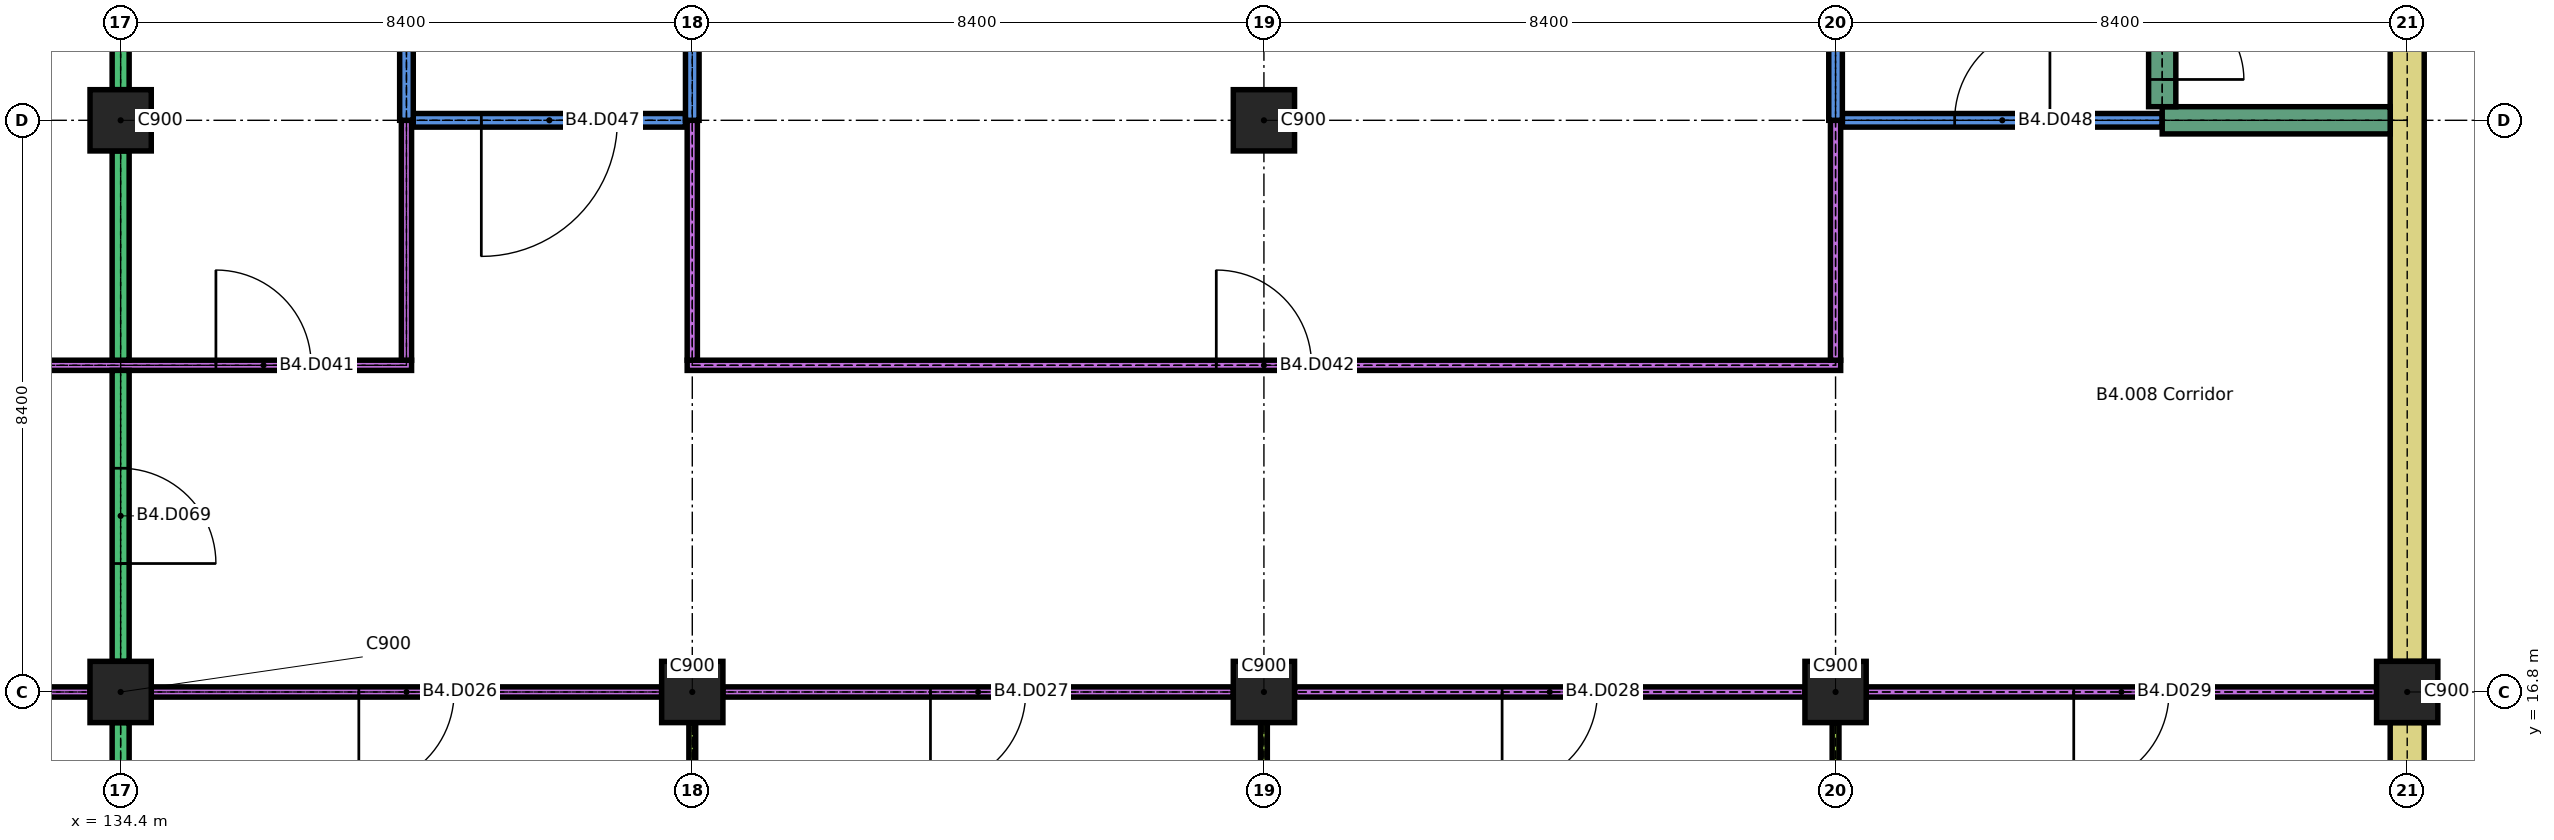
"""IFC4 building model, lengths in metres.
Left out: names, types, materials, properties, quantities, classifications, styles, units other than length and angle.
Written with IfcOpenShell. Run it as: python <this file> out.ifc"""

import sys

from ifc_helpers import new_model, si_unit, direction, frame, frame_2d, origin, origin_2d, place, context, subcontext, project, spatial, rectangle, extrude, element, fill, save


model = new_model("IFC4")
c1 = context("Model", 3, precision=1e-05, world=origin(), true_north=direction((0.0, 1.0)))
c2 = subcontext(c1, "Body", "Model", "MODEL_VIEW")
j1 = project(units=[si_unit("LENGTHUNIT", "METRE"), si_unit("PLANEANGLEUNIT", "RADIAN")], contexts=[c1])
p1 = place(None, origin())
s1 = spatial("IfcSite", under=j1, at=p1, CompositionType="ELEMENT")
p2 = place(p1, origin())
s2 = spatial("IfcBuilding", under=s1, at=p2, CompositionType="ELEMENT")
p3 = place(p2, frame((0.0, 0.0, -15.0)))
s3 = spatial("IfcBuildingStorey", under=s2, at=p3, CompositionType="ELEMENT", Elevation=-15.0)
for number, where, z_axis, x_axis in (
    (1, (134.4, 16.8, 0.0), (0.0, 0.0, 1.0), (1.0, 0.0, 0.0)),
    (2, (142.8, 16.8, 0.0), (0.0, 0.0, 1.0), (1.0, 0.0, 0.0)),
    (3, (151.2, 16.8, 0.0), (0.0, 0.0, 1.0), (1.0, 0.0, 0.0)),
    (4, (159.6, 16.8, 0.0), (0.0, 0.0, 1.0), (1.0, 0.0, 0.0)),
    (5, (168.0, 16.8, 0.0), (0.0, 0.0, 1.0), (1.0, 0.0, 0.0)),
    (6, (134.4, 25.2, 0.0), (0.0, 0.0, 1.0), (1.0, 0.0, 0.0)),
    (7, (151.2, 25.2, 0.0), (0.0, 0.0, 1.0), (1.0, 0.0, 0.0)),
):
    element("IfcColumn", number, at=place(p3, frame(where, z_axis=z_axis, x_axis=x_axis)), inside=s3, PredefinedType="COLUMN", context=c2, shape_type="SweptSolid", body=[
        extrude(rectangle(XDim=0.9, YDim=0.9, at=origin_2d()), origin(), (0.0, 0.0, 1.0), 3.2),
    ])
p4 = place(p3, frame((168.0, 8.85, 0.0), z_axis=(0.0, 0.0, 1.0), x_axis=(0.0, 1.0, 0.0)))
e8 = element("IfcWall", 8, at=p4, inside=s3, PredefinedType="SOLIDWALL", context=c2, shape_type="SweptSolid", body=[
    extrude(rectangle(XDim=7.5, YDim=0.5, at=frame_2d((3.75, 0.0))), origin(), (0.0, 0.0, 1.0), 3.2),
])
p5 = place(p3, frame((168.0, 17.25, 0.0), z_axis=(0.0, 0.0, 1.0), x_axis=(0.0, 1.0, 0.0)))
e9 = element("IfcWall", 9, at=p5, inside=s3, PredefinedType="SOLIDWALL", context=c2, shape_type="SweptSolid", body=[
    extrude(rectangle(XDim=16.6, YDim=0.5, at=frame_2d((8.3, 0.0))), origin(), (0.0, 0.0, 1.0), 3.2),
])
p6 = place(p3, frame((126.0, 16.8, 0.0), z_axis=(0.0, 0.0, 1.0), x_axis=(1.0, 0.0, 0.0)))
e10 = element("IfcWall", 10, at=p6, inside=s3, PredefinedType="PARTITIONING", context=c2, shape_type="SweptSolid", body=[
    extrude(rectangle(XDim=7.95, YDim=0.15, at=frame_2d((3.975, 0.0))), origin(), (0.0, 0.0, 1.0), 3.2),
])
p7 = place(p6, frame((3.275, 0.0, 0.0)))
e11 = element("IfcOpeningElement", 11, at=p7, cuts=e10, PredefinedType="OPENING", context=c2, shape_type="SweptSolid", body=[
    extrude(rectangle(XDim=1.4, YDim=2.1, at=frame_2d((0.7, 1.05))), frame((0.0, 0.085, 0.0), z_axis=(0.0, -1.0, 0.0), x_axis=(1.0, 0.0, 0.0)), (0.0, 0.0, 1.0), 0.17),
])
p8 = place(p3, frame((134.85, 16.8, 0.0), z_axis=(0.0, 0.0, 1.0), x_axis=(1.0, 0.0, 0.0)))
e12 = element("IfcWall", 12, at=p8, inside=s3, PredefinedType="PARTITIONING", context=c2, shape_type="SweptSolid", body=[
    extrude(rectangle(XDim=7.5, YDim=0.15, at=frame_2d((3.75, 0.0))), origin(), (0.0, 0.0, 1.0), 3.2),
])
p9 = place(p8, frame((3.05, 0.0, 0.0)))
e13 = element("IfcOpeningElement", 13, at=p9, cuts=e12, PredefinedType="OPENING", context=c2, shape_type="SweptSolid", body=[
    extrude(rectangle(XDim=1.4, YDim=2.1, at=frame_2d((0.7, 1.05))), frame((0.0, 0.085, 0.0), z_axis=(0.0, -1.0, 0.0), x_axis=(1.0, 0.0, 0.0)), (0.0, 0.0, 1.0), 0.17),
])
p10 = place(p3, frame((143.25, 16.8, 0.0), z_axis=(0.0, 0.0, 1.0), x_axis=(1.0, 0.0, 0.0)))
e14 = element("IfcWall", 14, at=p10, inside=s3, PredefinedType="PARTITIONING", context=c2, shape_type="SweptSolid", body=[
    extrude(rectangle(XDim=7.5, YDim=0.15, at=frame_2d((3.75, 0.0))), origin(), (0.0, 0.0, 1.0), 3.2),
])
p11 = place(p10, frame((3.05, 0.0, 0.0)))
e15 = element("IfcOpeningElement", 15, at=p11, cuts=e14, PredefinedType="OPENING", context=c2, shape_type="SweptSolid", body=[
    extrude(rectangle(XDim=1.4, YDim=2.1, at=frame_2d((0.7, 1.05))), frame((0.0, 0.085, 0.0), z_axis=(0.0, -1.0, 0.0), x_axis=(1.0, 0.0, 0.0)), (0.0, 0.0, 1.0), 0.17),
])
p12 = place(p3, frame((151.65, 16.8, 0.0), z_axis=(0.0, 0.0, 1.0), x_axis=(1.0, 0.0, 0.0)))
e16 = element("IfcWall", 16, at=p12, inside=s3, PredefinedType="PARTITIONING", context=c2, shape_type="SweptSolid", body=[
    extrude(rectangle(XDim=7.5, YDim=0.15, at=frame_2d((3.75, 0.0))), origin(), (0.0, 0.0, 1.0), 3.2),
])
p13 = place(p12, frame((3.05, 0.0, 0.0)))
e17 = element("IfcOpeningElement", 17, at=p13, cuts=e16, PredefinedType="OPENING", context=c2, shape_type="SweptSolid", body=[
    extrude(rectangle(XDim=1.4, YDim=2.1, at=frame_2d((0.7, 1.05))), frame((0.0, 0.085, 0.0), z_axis=(0.0, -1.0, 0.0), x_axis=(1.0, 0.0, 0.0)), (0.0, 0.0, 1.0), 0.17),
])
p14 = place(p3, frame((160.05, 16.8, 0.0), z_axis=(0.0, 0.0, 1.0), x_axis=(1.0, 0.0, 0.0)))
e18 = element("IfcWall", 18, at=p14, inside=s3, PredefinedType="PARTITIONING", context=c2, shape_type="SweptSolid", body=[
    extrude(rectangle(XDim=7.5, YDim=0.15, at=frame_2d((3.75, 0.0))), origin(), (0.0, 0.0, 1.0), 3.2),
])
p15 = place(p14, frame((3.05, 0.0, 0.0)))
e19 = element("IfcOpeningElement", 19, at=p15, cuts=e18, PredefinedType="OPENING", context=c2, shape_type="SweptSolid", body=[
    extrude(rectangle(XDim=1.4, YDim=2.1, at=frame_2d((0.7, 1.05))), frame((0.0, 0.085, 0.0), z_axis=(0.0, -1.0, 0.0), x_axis=(1.0, 0.0, 0.0)), (0.0, 0.0, 1.0), 0.17),
])
p16 = place(p3, frame((126.0, 21.6, 0.0), z_axis=(0.0, 0.0, 1.0), x_axis=(1.0, 0.0, 0.0)))
e20 = element("IfcWall", 20, at=p16, inside=s3, PredefinedType="PARTITIONING", context=c2, shape_type="SweptSolid", body=[
    extrude(rectangle(XDim=12.675, YDim=0.15, at=frame_2d((6.337, 0.0))), origin(), (0.0, 0.0, 1.0), 3.2),
])
p17 = place(p16, frame((3.5, 0.0, 0.0)))
e21 = element("IfcOpeningElement", 21, at=p17, cuts=e20, PredefinedType="OPENING", context=c2, shape_type="SweptSolid", body=[
    extrude(rectangle(XDim=1.4, YDim=2.1, at=frame_2d((0.7, 1.05))), frame((0.0, 0.085, 0.0), z_axis=(0.0, -1.0, 0.0), x_axis=(1.0, 0.0, 0.0)), (0.0, 0.0, 1.0), 0.17),
])
p18 = place(p16, frame((9.8, 0.0, 0.0)))
e22 = element("IfcOpeningElement", 22, at=p18, cuts=e20, PredefinedType="OPENING", context=c2, shape_type="SweptSolid", body=[
    extrude(rectangle(XDim=1.4, YDim=2.1, at=frame_2d((0.7, 1.05))), frame((0.0, 0.085, 0.0), z_axis=(0.0, -1.0, 0.0), x_axis=(1.0, 0.0, 0.0)), (0.0, 0.0, 1.0), 0.17),
])
p19 = place(p3, frame((142.725, 21.6, 0.0), z_axis=(0.0, 0.0, 1.0), x_axis=(1.0, 0.0, 0.0)))
e23 = element("IfcWall", 23, at=p19, inside=s3, PredefinedType="PARTITIONING", context=c2, shape_type="SweptSolid", body=[
    extrude(rectangle(XDim=16.95, YDim=0.15, at=frame_2d((8.475, 0.0))), origin(), (0.0, 0.0, 1.0), 3.2),
])
p20 = place(p19, frame((7.775, 0.0, 0.0)))
e24 = element("IfcOpeningElement", 24, at=p20, cuts=e23, PredefinedType="OPENING", context=c2, shape_type="SweptSolid", body=[
    extrude(rectangle(XDim=1.4, YDim=2.1, at=frame_2d((0.7, 1.05))), frame((0.0, 0.085, 0.0), z_axis=(0.0, -1.0, 0.0), x_axis=(1.0, 0.0, 0.0)), (0.0, 0.0, 1.0), 0.17),
])
p21 = place(p3, frame((138.7, 25.2, 0.0), z_axis=(0.0, 0.0, 1.0), x_axis=(1.0, 0.0, 0.0)))
e25 = element("IfcWall", 25, at=p21, inside=s3, PredefinedType="PARTITIONING", context=c2, shape_type="SweptSolid", body=[
    extrude(rectangle(XDim=4.0, YDim=0.2, at=frame_2d((2.0, 0.0))), origin(), (0.0, 0.0, 1.0), 3.2),
])
p22 = place(p21, frame((1.0, 0.0, 0.0)))
e26 = element("IfcOpeningElement", 26, at=p22, cuts=e25, PredefinedType="OPENING", context=c2, shape_type="SweptSolid", body=[
    extrude(rectangle(XDim=2.0, YDim=2.4, at=frame_2d((1.0, 1.2))), frame((0.0, 0.11, 0.0), z_axis=(0.0, -1.0, 0.0), x_axis=(1.0, 0.0, 0.0)), (0.0, 0.0, 1.0), 0.22),
])
p23 = place(p3, frame((159.7, 25.2, 0.0), z_axis=(0.0, 0.0, 1.0), x_axis=(1.0, 0.0, 0.0)))
e27 = element("IfcWall", 27, at=p23, inside=s3, PredefinedType="PARTITIONING", context=c2, shape_type="SweptSolid", body=[
    extrude(rectangle(XDim=4.7, YDim=0.2, at=frame_2d((2.35, 0.0))), origin(), (0.0, 0.0, 1.0), 3.2),
])
p24 = place(p23, frame((1.65, 0.0, 0.0)))
e28 = element("IfcOpeningElement", 28, at=p24, cuts=e27, PredefinedType="OPENING", context=c2, shape_type="SweptSolid", body=[
    extrude(rectangle(XDim=1.4, YDim=2.1, at=frame_2d((0.7, 1.05))), frame((0.0, 0.11, 0.0), z_axis=(0.0, -1.0, 0.0), x_axis=(1.0, 0.0, 0.0)), (0.0, 0.0, 1.0), 0.22),
])
p25 = place(p3, frame((164.4, 25.2, 0.0), z_axis=(0.0, 0.0, 1.0), x_axis=(1.0, 0.0, 0.0)))
e29 = element("IfcWall", 29, at=p25, inside=s3, PredefinedType="SHEAR", context=c2, shape_type="SweptSolid", body=[
    extrude(rectangle(XDim=3.35, YDim=0.4, at=frame_2d((1.675, 0.0))), origin(), (0.0, 0.0, 1.0), 3.2),
])
p26 = place(p3, frame((134.4, 8.85, 0.0), z_axis=(0.0, 0.0, 1.0), x_axis=(0.0, 1.0, 0.0)))
e30 = element("IfcWall", 30, at=p26, inside=s3, PredefinedType="SOLIDWALL", context=c2, shape_type="SweptSolid", body=[
    extrude(rectangle(XDim=7.5, YDim=0.25, at=frame_2d((3.75, 0.0))), origin(), (0.0, 0.0, 1.0), 3.2),
])
p27 = place(p3, frame((134.4, 17.25, 0.0), z_axis=(0.0, 0.0, 1.0), x_axis=(0.0, 1.0, 0.0)))
e31 = element("IfcWall", 31, at=p27, inside=s3, PredefinedType="SOLIDWALL", context=c2, shape_type="SweptSolid", body=[
    extrude(rectangle(XDim=4.275, YDim=0.25, at=frame_2d((2.137, 0.0))), origin(), (0.0, 0.0, 1.0), 3.2),
])
p28 = place(p27, frame((1.438, 0.0, 0.0)))
e32 = element("IfcOpeningElement", 32, at=p28, cuts=e31, PredefinedType="OPENING", context=c2, shape_type="SweptSolid", body=[
    extrude(rectangle(XDim=1.4, YDim=2.1, at=frame_2d((0.7, 1.05))), frame((0.0, 0.135, 0.0), z_axis=(0.0, -1.0, 0.0), x_axis=(1.0, 0.0, 0.0)), (0.0, 0.0, 1.0), 0.27),
])
p29 = place(p3, frame((134.4, 21.675, 0.0), z_axis=(0.0, 0.0, 1.0), x_axis=(0.0, 1.0, 0.0)))
e33 = element("IfcWall", 33, at=p29, inside=s3, PredefinedType="SOLIDWALL", context=c2, shape_type="SweptSolid", body=[
    extrude(rectangle(XDim=3.075, YDim=0.25, at=frame_2d((1.538, 0.0))), origin(), (0.0, 0.0, 1.0), 3.2),
])
p30 = place(p3, frame((134.4, 25.65, 0.0), z_axis=(0.0, 0.0, 1.0), x_axis=(0.0, 1.0, 0.0)))
e34 = element("IfcWall", 34, at=p30, inside=s3, PredefinedType="SOLIDWALL", context=c2, shape_type="SweptSolid", body=[
    extrude(rectangle(XDim=7.5, YDim=0.25, at=frame_2d((3.75, 0.0))), origin(), (0.0, 0.0, 1.0), 3.2),
])
p31 = place(p3, frame((138.6, 21.675, 0.0), z_axis=(0.0, 0.0, 1.0), x_axis=(0.0, 1.0, 0.0)))
e35 = element("IfcWall", 35, at=p31, inside=s3, PredefinedType="PARTITIONING", context=c2, shape_type="SweptSolid", body=[
    extrude(rectangle(XDim=3.525, YDim=0.15, at=frame_2d((1.762, 0.0))), origin(), (0.0, 0.0, 1.0), 3.2),
])
p32 = place(p3, frame((138.6, 25.2, 0.0), z_axis=(0.0, 0.0, 1.0), x_axis=(0.0, 1.0, 0.0)))
e36 = element("IfcWall", 36, at=p32, inside=s3, PredefinedType="PARTITIONING", context=c2, shape_type="SweptSolid", body=[
    extrude(rectangle(XDim=4.8, YDim=0.2, at=frame_2d((2.4, 0.0))), origin(), (0.0, 0.0, 1.0), 3.2),
])
p33 = place(p3, frame((142.8, 8.85, 0.0), z_axis=(0.0, 0.0, 1.0), x_axis=(0.0, 1.0, 0.0)))
e37 = element("IfcWall", 37, at=p33, inside=s3, PredefinedType="PARTITIONING", context=c2, shape_type="SweptSolid", body=[
    extrude(rectangle(XDim=7.5, YDim=0.1, at=frame_2d((3.75, 0.0))), origin(), (0.0, 0.0, 1.0), 3.2),
])
p34 = place(p3, frame((142.8, 21.675, 0.0), z_axis=(0.0, 0.0, 1.0), x_axis=(0.0, 1.0, 0.0)))
e38 = element("IfcWall", 38, at=p34, inside=s3, PredefinedType="PARTITIONING", context=c2, shape_type="SweptSolid", body=[
    extrude(rectangle(XDim=3.525, YDim=0.15, at=frame_2d((1.762, 0.0))), origin(), (0.0, 0.0, 1.0), 3.2),
])
p35 = place(p3, frame((142.8, 25.2, 0.0), z_axis=(0.0, 0.0, 1.0), x_axis=(0.0, 1.0, 0.0)))
e39 = element("IfcWall", 39, at=p35, inside=s3, PredefinedType="PARTITIONING", context=c2, shape_type="SweptSolid", body=[
    extrude(rectangle(XDim=4.8, YDim=0.2, at=frame_2d((2.4, 0.0))), origin(), (0.0, 0.0, 1.0), 3.2),
])
for number, where, z_axis, x_axis in (
    (40, (151.2, 8.85, 0.0), (0.0, 0.0, 1.0), (0.0, 1.0, 0.0)),
    (41, (159.6, 8.85, 0.0), (0.0, 0.0, 1.0), (0.0, 1.0, 0.0)),
):
    element("IfcWall", number, at=place(p3, frame(where, z_axis=z_axis, x_axis=x_axis)), inside=s3, PredefinedType="PARTITIONING", context=c2, shape_type="SweptSolid", body=[
        extrude(rectangle(XDim=7.5, YDim=0.1, at=frame_2d((3.75, 0.0))), origin(), (0.0, 0.0, 1.0), 3.2),
    ])
p36 = place(p3, frame((159.6, 21.675, 0.0), z_axis=(0.0, 0.0, 1.0), x_axis=(0.0, 1.0, 0.0)))
e42 = element("IfcWall", 42, at=p36, inside=s3, PredefinedType="PARTITIONING", context=c2, shape_type="SweptSolid", body=[
    extrude(rectangle(XDim=3.525, YDim=0.15, at=frame_2d((1.762, 0.0))), origin(), (0.0, 0.0, 1.0), 3.2),
])
p37 = place(p3, frame((159.6, 25.2, 0.0), z_axis=(0.0, 0.0, 1.0), x_axis=(0.0, 1.0, 0.0)))
e43 = element("IfcWall", 43, at=p37, inside=s3, PredefinedType="PARTITIONING", context=c2, shape_type="SweptSolid", body=[
    extrude(rectangle(XDim=8.15, YDim=0.2, at=frame_2d((4.075, 0.0))), origin(), (0.0, 0.0, 1.0), 3.2),
])
p38 = place(p3, frame((164.4, 25.4, 0.0), z_axis=(0.0, 0.0, 1.0), x_axis=(0.0, 1.0, 0.0)))
e44 = element("IfcWall", 44, at=p38, inside=s3, PredefinedType="SHEAR", context=c2, shape_type="SweptSolid", body=[
    extrude(rectangle(XDim=7.95, YDim=0.4, at=frame_2d((3.975, 0.0))), origin(), (0.0, 0.0, 1.0), 3.2),
])
p39 = place(p38, frame((0.4, 0.0, 0.0)))
e45 = element("IfcOpeningElement", 45, at=p39, cuts=e44, PredefinedType="OPENING", context=c2, shape_type="SweptSolid", body=[
    extrude(rectangle(XDim=1.2, YDim=2.1, at=frame_2d((0.6, 1.05))), frame((0.0, 0.21, 0.0), z_axis=(0.0, -1.0, 0.0), x_axis=(1.0, 0.0, 0.0)), (0.0, 0.0, 1.0), 0.42),
])
p40 = place(p9, origin())
e46 = element("IfcDoor", 46, at=p40, inside=s3, OperationType="SINGLE_SWING_LEFT", PredefinedType="DOOR", context=c2, shape_type="SweptSolid", body=[
    extrude(rectangle(XDim=1.4, YDim=2.1, at=frame_2d((0.7, 1.05))), frame((0.0, 0.025, 0.0), z_axis=(0.0, -1.0, 0.0), x_axis=(1.0, 0.0, 0.0)), (0.0, 0.0, 1.0), 0.05),
])
fill(e13, e46)
p41 = place(p11, origin())
e47 = element("IfcDoor", 47, at=p41, inside=s3, OperationType="SINGLE_SWING_LEFT", PredefinedType="DOOR", context=c2, shape_type="SweptSolid", body=[
    extrude(rectangle(XDim=1.4, YDim=2.1, at=frame_2d((0.7, 1.05))), frame((0.0, 0.025, 0.0), z_axis=(0.0, -1.0, 0.0), x_axis=(1.0, 0.0, 0.0)), (0.0, 0.0, 1.0), 0.05),
])
fill(e15, e47)
p42 = place(p13, origin())
e48 = element("IfcDoor", 48, at=p42, inside=s3, OperationType="SINGLE_SWING_LEFT", PredefinedType="DOOR", context=c2, shape_type="SweptSolid", body=[
    extrude(rectangle(XDim=1.4, YDim=2.1, at=frame_2d((0.7, 1.05))), frame((0.0, 0.025, 0.0), z_axis=(0.0, -1.0, 0.0), x_axis=(1.0, 0.0, 0.0)), (0.0, 0.0, 1.0), 0.05),
])
fill(e17, e48)
p43 = place(p15, origin())
e49 = element("IfcDoor", 49, at=p43, inside=s3, OperationType="SINGLE_SWING_LEFT", PredefinedType="DOOR", context=c2, shape_type="SweptSolid", body=[
    extrude(rectangle(XDim=1.4, YDim=2.1, at=frame_2d((0.7, 1.05))), frame((0.0, 0.025, 0.0), z_axis=(0.0, -1.0, 0.0), x_axis=(1.0, 0.0, 0.0)), (0.0, 0.0, 1.0), 0.05),
])
fill(e19, e49)
p44 = place(p18, origin())
e50 = element("IfcDoor", 50, at=p44, inside=s3, OperationType="SINGLE_SWING_RIGHT", PredefinedType="DOOR", context=c2, shape_type="SweptSolid", body=[
    extrude(rectangle(XDim=1.4, YDim=2.1, at=frame_2d((0.7, 1.05))), frame((0.0, 0.025, 0.0), z_axis=(0.0, -1.0, 0.0), x_axis=(1.0, 0.0, 0.0)), (0.0, 0.0, 1.0), 0.05),
])
fill(e22, e50)
p45 = place(p20, origin())
e51 = element("IfcDoor", 51, at=p45, inside=s3, OperationType="SINGLE_SWING_RIGHT", PredefinedType="DOOR", context=c2, shape_type="SweptSolid", body=[
    extrude(rectangle(XDim=1.4, YDim=2.1, at=frame_2d((0.7, 1.05))), frame((0.0, 0.025, 0.0), z_axis=(0.0, -1.0, 0.0), x_axis=(1.0, 0.0, 0.0)), (0.0, 0.0, 1.0), 0.05),
])
fill(e24, e51)
p46 = place(p22, origin())
e52 = element("IfcDoor", 52, at=p46, inside=s3, OperationType="SINGLE_SWING_LEFT", PredefinedType="DOOR", context=c2, shape_type="SweptSolid", body=[
    extrude(rectangle(XDim=2.0, YDim=2.4, at=frame_2d((1.0, 1.2))), frame((0.0, 0.03, 0.0), z_axis=(0.0, -1.0, 0.0), x_axis=(1.0, 0.0, 0.0)), (0.0, 0.0, 1.0), 0.06),
])
fill(e26, e52)
p47 = place(p24, origin())
e53 = element("IfcDoor", 53, at=p47, inside=s3, OperationType="SINGLE_SWING_LEFT", PredefinedType="DOOR", context=c2, shape_type="SweptSolid", body=[
    extrude(rectangle(XDim=1.4, YDim=2.1, at=frame_2d((0.7, 1.05))), frame((0.0, 0.03, 0.0), z_axis=(0.0, -1.0, 0.0), x_axis=(1.0, 0.0, 0.0)), (0.0, 0.0, 1.0), 0.06),
])
fill(e28, e53)
p48 = place(p28, origin())
e54 = element("IfcDoor", 54, at=p48, inside=s3, OperationType="SINGLE_SWING_LEFT", PredefinedType="DOOR", context=c2, shape_type="SweptSolid", body=[
    extrude(rectangle(XDim=1.4, YDim=2.1, at=frame_2d((0.7, 1.05))), frame((0.0, 0.03, 0.0), z_axis=(0.0, -1.0, 0.0), x_axis=(1.0, 0.0, 0.0)), (0.0, 0.0, 1.0), 0.06),
])
fill(e32, e54)
p49 = place(p39, origin())
e55 = element("IfcDoor", 55, at=p49, inside=s3, OperationType="SINGLE_SWING_LEFT", PredefinedType="DOOR", context=c2, shape_type="SweptSolid", body=[
    extrude(rectangle(XDim=1.2, YDim=2.1, at=frame_2d((0.6, 1.05))), frame((0.0, 0.025, 0.0), z_axis=(0.0, -1.0, 0.0), x_axis=(1.0, 0.0, 0.0)), (0.0, 0.0, 1.0), 0.05),
])
fill(e45, e55)
save(model, sys.argv[1])
